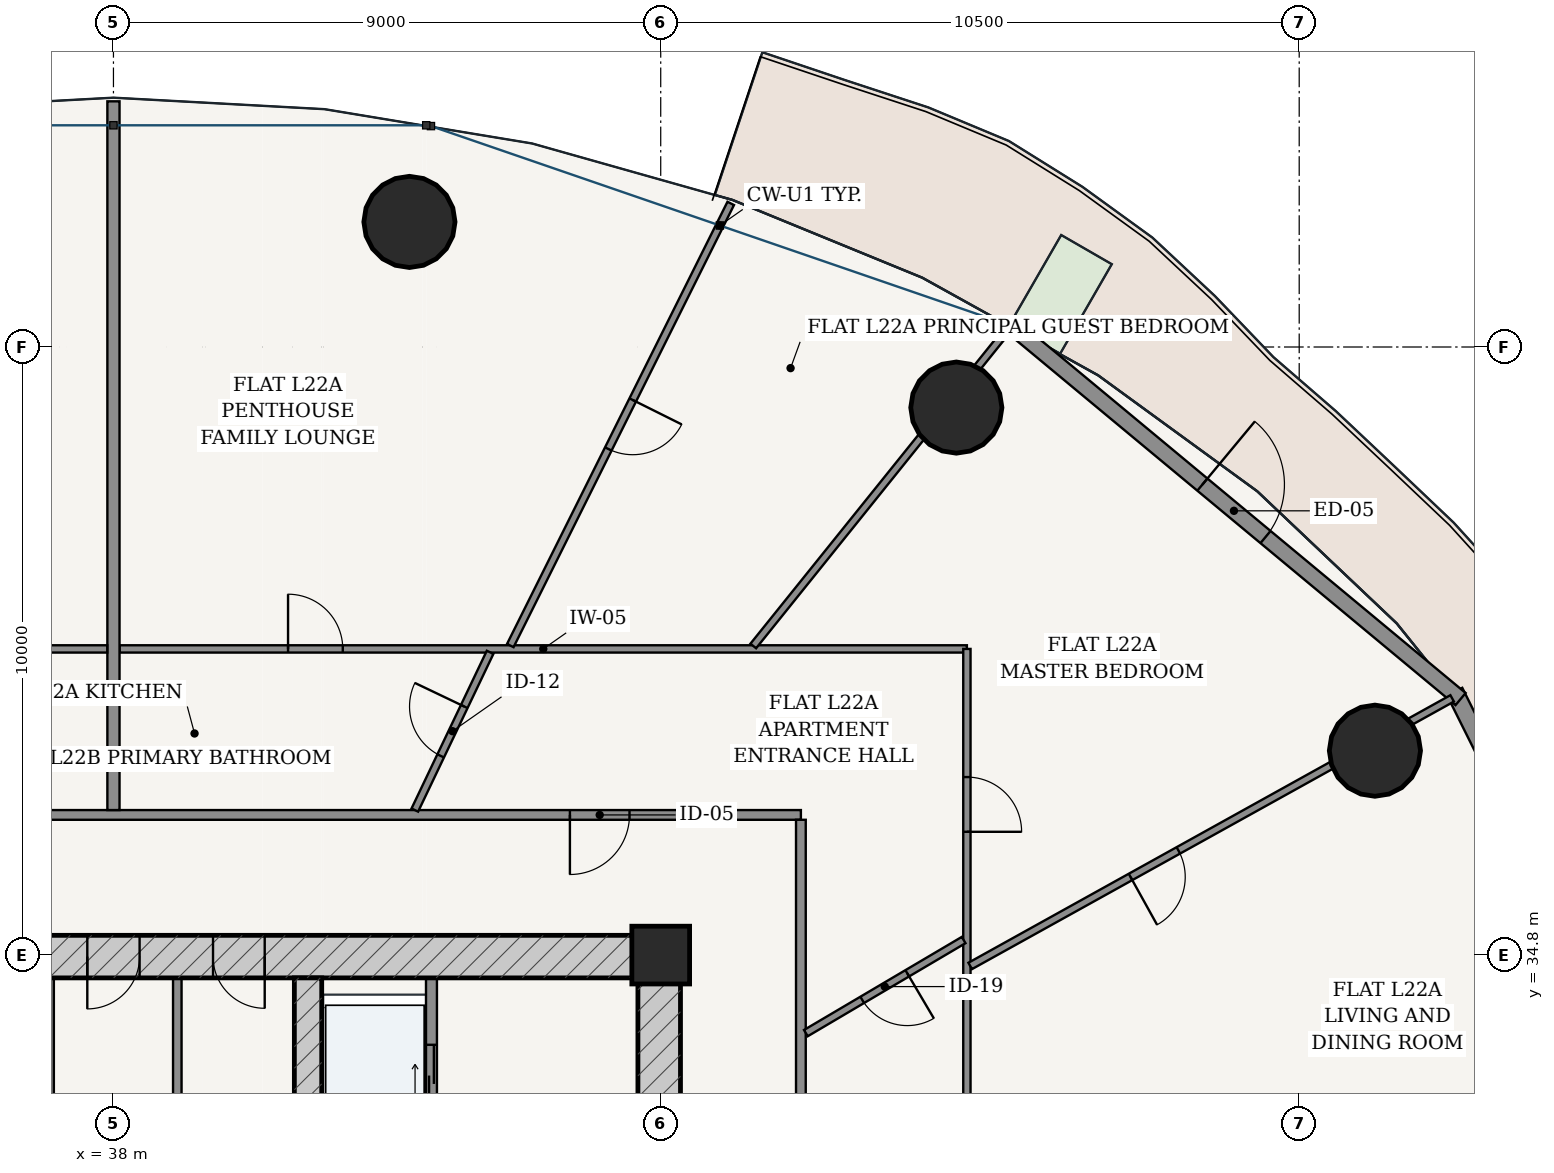
"""IFC4 building model, lengths in metres.
Left out: names, types, materials, properties, quantities, classifications, styles, units other than length and angle.
Written with IfcOpenShell. Run it as: python <this file> out.ifc"""

import sys

from ifc_helpers import new_model, si_unit, direction, frame, frame_2d, origin, origin_2d, place, context, subcontext, project, spatial, rectangle, hollow_circle, extrude, source, transform, mapped, element, fill, save


model = new_model("IFC4")
c1 = context("Model", 3, precision=1e-05, world=origin(), true_north=direction((-0.2419218956, 0.970295726276)))
c2 = subcontext(c1, "Body", "Model", "MODEL_VIEW")
j1 = project(units=[si_unit("LENGTHUNIT", "METRE"), si_unit("PLANEANGLEUNIT", "RADIAN")], contexts=[c1])
p1 = place(None, origin())
s1 = spatial("IfcSite", under=j1, at=p1, CompositionType="ELEMENT")
p2 = place(p1, origin())
s2 = spatial("IfcBuilding", under=s1, at=p2, CompositionType="ELEMENT")
p3 = place(p2, frame((0.0, 0.0, 87.0)))
s3 = spatial("IfcBuildingStorey", under=s2, at=p3, CompositionType="ELEMENT", Elevation=87.0)
p4 = place(p3, frame((47.0, 34.8, 0.0), z_axis=(0.0, 0.0, 1.0), x_axis=(1.0, 0.0, 0.0)))
e1 = element("IfcColumn", 1, at=p4, inside=s3, PredefinedType="COLUMN", context=c2, shape_type="SweptSolid", body=[
    extrude(rectangle(XDim=0.95, YDim=0.95, at=origin_2d()), origin(), (0.0, 0.0, 1.0), 3.6),
])
p5 = place(p3, frame((28.675, 34.775, 0.0), z_axis=(0.0, 0.0, 1.0), x_axis=(1.0, 0.0, 0.0)))
e2 = element("IfcWall", 2, at=p5, inside=s3, PredefinedType="SHEAR", context=c2, shape_type="SweptSolid", body=[
    extrude(rectangle(XDim=18.65, YDim=0.7, at=frame_2d((9.325, 0.0))), origin(), (0.0, 0.0, 1.0), 3.325),
])
p6 = place(p5, frame((6.837, 0.0, 0.0)))
e3 = element("IfcOpeningElement", 3, at=p6, cuts=e2, PredefinedType="OPENING", context=c2, shape_type="SweptSolid", body=[
    extrude(rectangle(XDim=0.85, YDim=2.1, at=frame_2d((0.425, 1.05))), frame((0.0, 0.36, 0.0), z_axis=(0.0, -1.0, 0.0), x_axis=(1.0, 0.0, 0.0)), (0.0, 0.0, 1.0), 0.72),
])
p7 = place(p5, frame((8.895, 0.0, 0.0)))
e4 = element("IfcOpeningElement", 4, at=p7, cuts=e2, PredefinedType="OPENING", context=c2, shape_type="SweptSolid", body=[
    extrude(rectangle(XDim=0.86, YDim=2.1, at=frame_2d((0.43, 1.05))), frame((0.0, 0.36, 0.0), z_axis=(0.0, -1.0, 0.0), x_axis=(1.0, 0.0, 0.0)), (0.0, 0.0, 1.0), 0.72),
])
p8 = place(p5, frame((10.962, 0.0, 0.0)))
e5 = element("IfcOpeningElement", 5, at=p8, cuts=e2, PredefinedType="OPENING", context=c2, shape_type="SweptSolid", body=[
    extrude(rectangle(XDim=0.85, YDim=2.1, at=frame_2d((0.425, 1.05))), frame((0.0, 0.36, 0.0), z_axis=(0.0, -1.0, 0.0), x_axis=(1.0, 0.0, 0.0)), (0.0, 0.0, 1.0), 0.72),
])
p9 = place(p3, frame((46.975, 19.175, 0.0), z_axis=(0.0, 0.0, 1.0), x_axis=(0.0, 1.0, 0.0)))
e6 = element("IfcWall", 6, at=p9, inside=s3, PredefinedType="SHEAR", context=c2, shape_type="SweptSolid", body=[
    extrude(rectangle(XDim=15.25, YDim=0.7, at=frame_2d((7.625, 0.0))), origin(), (0.0, 0.0, 1.0), 3.325),
])
p10 = place(p9, frame((9.875, 0.0, 0.0)))
e7 = element("IfcOpeningElement", 7, at=p10, cuts=e6, PredefinedType="OPENING", context=c2, shape_type="SweptSolid", body=[
    extrude(rectangle(XDim=1.5, YDim=2.2, at=frame_2d((0.75, 1.1))), frame((0.0, 0.36, 0.0), z_axis=(0.0, -1.0, 0.0), x_axis=(1.0, 0.0, 0.0)), (0.0, 0.0, 1.0), 0.72),
])
p11 = place(p3, frame((41.2, 19.175, 0.0), z_axis=(0.0, 0.0, 1.0), x_axis=(0.0, 1.0, 0.0)))
e8 = element("IfcWall", 8, at=p11, inside=s3, PredefinedType="SHEAR", context=c2, shape_type="SweptSolid", body=[
    extrude(rectangle(XDim=15.25, YDim=0.45, at=frame_2d((7.625, 0.0))), origin(), (0.0, 0.0, 1.0), 3.325),
])
p12 = place(p11, frame((7.8, 0.0, 0.0)))
e9 = element("IfcOpeningElement", 9, at=p12, cuts=e8, PredefinedType="OPENING", context=c2, shape_type="SweptSolid", body=[
    extrude(rectangle(XDim=1.05, YDim=2.15, at=frame_2d((0.525, 1.075))), frame((0.0, 0.235, 0.0), z_axis=(0.0, -1.0, 0.0), x_axis=(1.0, 0.0, 0.0)), (0.0, 0.0, 1.0), 0.47),
])
for number, where, z_axis, x_axis in (
    (10, (58.745, 38.161, 0.0), (0.0, 0.0, 1.0), (1.0, 0.0, 0.0)),
    (11, (51.862, 43.803, 0.0), (0.0, 0.0, 1.0), (1.0, 0.0, 0.0)),
    (12, (42.867, 46.857, 0.0), (0.0, 0.0, 1.0), (1.0, 0.0, 0.0)),
):
    element("IfcColumn", number, at=place(p3, frame(where, z_axis=z_axis, x_axis=x_axis)), inside=s3, PredefinedType="COLUMN", context=c2, shape_type="SweptSolid", body=[
        extrude(hollow_circle(Radius=0.75, WallThickness=0.045, at=origin_2d()), origin(), (0.0, 0.0, 1.0), 3.6),
    ])
p13 = place(p3, frame((64.095, 31.034, 0.0), z_axis=(0.0, 0.0, 1.0), x_axis=(-0.446263788661, 0.894901464369, 0.0)))
e13 = element("IfcWall", 13, at=p13, inside=s3, PredefinedType="SOLIDWALL", context=c2, shape_type="SweptSolid", body=[
    extrude(rectangle(XDim=9.05, YDim=0.28, at=frame_2d((4.525, 0.0))), origin(), (0.0, 0.0, 1.0), 3.325),
])
p14 = place(p13, frame((1.394, 0.0, 0.85)))
e14 = element("IfcOpeningElement", 14, at=p14, cuts=e13, PredefinedType="OPENING", context=c2, shape_type="SweptSolid", body=[
    extrude(rectangle(XDim=2.1, YDim=1.95, at=frame_2d((1.05, 0.975))), frame((0.0, 0.15, 0.0), z_axis=(0.0, -1.0, 0.0), x_axis=(1.0, 0.0, 0.0)), (0.0, 0.0, 1.0), 0.3),
])
p15 = place(p13, frame((5.557, 0.0, 0.85)))
e15 = element("IfcOpeningElement", 15, at=p15, cuts=e13, PredefinedType="OPENING", context=c2, shape_type="SweptSolid", body=[
    extrude(rectangle(XDim=2.1, YDim=1.95, at=frame_2d((1.05, 0.975))), frame((0.0, 0.15, 0.0), z_axis=(0.0, -1.0, 0.0), x_axis=(1.0, 0.0, 0.0)), (0.0, 0.0, 1.0), 0.3),
])
p16 = place(p3, frame((60.154, 39.01, 0.0), z_axis=(0.0, 0.0, 1.0), x_axis=(-0.769242574941, 0.638956853706, 0.0)))
e16 = element("IfcWall", 16, at=p16, inside=s3, PredefinedType="SOLIDWALL", context=c2, shape_type="SweptSolid", body=[
    extrude(rectangle(XDim=9.69, YDim=0.26, at=frame_2d((4.845, 0.0))), origin(), (0.0, 0.0, 1.0), 3.325),
])
p17 = place(p16, frame((4.17, 0.0, 0.0)))
e17 = element("IfcOpeningElement", 17, at=p17, cuts=e16, PredefinedType="OPENING", context=c2, shape_type="SweptSolid", body=[
    extrude(rectangle(XDim=1.35, YDim=2.2, at=frame_2d((0.675, 1.1))), frame((0.0, 0.14, 0.0), z_axis=(0.0, -1.0, 0.0), x_axis=(1.0, 0.0, 0.0)), (0.0, 0.0, 1.0), 0.28),
])
p18 = place(p3, frame((43.23, 28.52, 0.0), z_axis=(0.0, 0.0, 1.0), x_axis=(0.0, 1.0, 0.0)))
e18 = element("IfcWall", 18, at=p18, inside=s3, PredefinedType="PARTITIONING", context=c2, shape_type="SweptSolid", body=[
    extrude(rectangle(XDim=5.905, YDim=0.18, at=frame_2d((2.953, 0.0))), origin(), (0.0, 0.0, 1.0), 3.325),
])
p19 = place(p18, frame((0.905, 0.0, 0.0)))
e19 = element("IfcOpeningElement", 19, at=p19, cuts=e18, PredefinedType="OPENING", context=c2, shape_type="SweptSolid", body=[
    extrude(rectangle(XDim=0.85, YDim=2.1, at=frame_2d((0.425, 1.05))), frame((0.0, 0.1, 0.0), z_axis=(0.0, -1.0, 0.0), x_axis=(1.0, 0.0, 0.0)), (0.0, 0.0, 1.0), 0.2),
])
p20 = place(p18, frame((3.655, 0.0, 0.0)))
e20 = element("IfcOpeningElement", 20, at=p20, cuts=e18, PredefinedType="OPENING", context=c2, shape_type="SweptSolid", body=[
    extrude(rectangle(XDim=1.15, YDim=2.2, at=frame_2d((0.575, 1.1))), frame((0.0, 0.1, 0.0), z_axis=(0.0, -1.0, 0.0), x_axis=(1.0, 0.0, 0.0)), (0.0, 0.0, 1.0), 0.2),
])
for number, where, z_axis, x_axis in (
    (21, (36.95, 31.2, 0.0), (0.0, 0.0, 1.0), (0.0, 1.0, 0.0)),
    (22, (39.05, 31.2, 0.0), (0.0, 0.0, 1.0), (0.0, 1.0, 0.0)),
):
    element("IfcWall", number, at=place(p3, frame(where, z_axis=z_axis, x_axis=x_axis)), inside=s3, PredefinedType="PARTITIONING", context=c2, shape_type="SweptSolid", body=[
        extrude(rectangle(XDim=3.225, YDim=0.14, at=frame_2d((1.613, 0.0))), origin(), (0.0, 0.0, 1.0), 3.325),
    ])
p21 = place(p3, frame((26.695, 37.105, 0.0), z_axis=(0.0, 0.0, 1.0), x_axis=(1.0, 0.0, 0.0)))
e23 = element("IfcWall", 23, at=p21, inside=s3, PredefinedType="PARTITIONING", context=c2, shape_type="SweptSolid", body=[
    extrude(rectangle(XDim=22.61, YDim=0.16, at=frame_2d((11.305, 0.0))), origin(), (0.0, 0.0, 1.0), 2.767),
])
p22 = place(p21, frame((18.812, 0.0, 0.0)))
e24 = element("IfcOpeningElement", 24, at=p22, cuts=e23, PredefinedType="OPENING", context=c2, shape_type="SweptSolid", body=[
    extrude(rectangle(XDim=0.98, YDim=2.2, at=frame_2d((0.49, 1.1))), frame((0.0, 0.09, 0.0), z_axis=(0.0, -1.0, 0.0), x_axis=(1.0, 0.0, 0.0)), (0.0, 0.0, 1.0), 0.18),
])
p23 = place(p21, frame((2.823, 0.0, 0.0)))
e25 = element("IfcOpeningElement", 25, at=p23, cuts=e23, PredefinedType="OPENING", context=c2, shape_type="SweptSolid", body=[
    extrude(rectangle(XDim=0.98, YDim=2.2, at=frame_2d((0.49, 1.1))), frame((0.0, 0.09, 0.0), z_axis=(0.0, -1.0, 0.0), x_axis=(1.0, 0.0, 0.0)), (0.0, 0.0, 1.0), 0.18),
])
p24 = place(p3, frame((49.305, 16.575, 0.0), z_axis=(0.0, 0.0, 1.0), x_axis=(0.0, 1.0, 0.0)))
e26 = element("IfcWall", 26, at=p24, inside=s3, PredefinedType="PARTITIONING", context=c2, shape_type="SweptSolid", body=[
    extrude(rectangle(XDim=20.45, YDim=0.16, at=frame_2d((10.225, 0.0))), origin(), (0.0, 0.0, 1.0), 2.767),
])
p25 = place(p24, frame((1.649, 0.0, 0.0)))
e27 = element("IfcOpeningElement", 27, at=p25, cuts=e26, PredefinedType="OPENING", context=c2, shape_type="SweptSolid", body=[
    extrude(rectangle(XDim=0.98, YDim=2.2, at=frame_2d((0.49, 1.1))), frame((0.0, 0.09, 0.0), z_axis=(0.0, -1.0, 0.0), x_axis=(1.0, 0.0, 0.0)), (0.0, 0.0, 1.0), 0.18),
])
p26 = place(p3, frame((38.102, 39.835, 0.0), z_axis=(0.0, 0.0, 1.0), x_axis=(1.0, 0.0, 0.0)))
e28 = element("IfcWall", 28, at=p26, inside=s3, PredefinedType="PARTITIONING", context=c2, shape_type="SweptSolid", body=[
    extrude(rectangle(XDim=13.933, YDim=0.12, at=frame_2d((6.966, 0.0))), origin(), (0.0, 0.0, 1.0), 2.767),
])
p27 = place(p26, frame((2.769, 0.0, 0.0)))
e29 = element("IfcOpeningElement", 29, at=p27, cuts=e28, PredefinedType="OPENING", context=c2, shape_type="SweptSolid", body=[
    extrude(rectangle(XDim=0.9, YDim=2.15, at=frame_2d((0.45, 1.075))), frame((0.0, 0.07, 0.0), z_axis=(0.0, -1.0, 0.0), x_axis=(1.0, 0.0, 0.0)), (0.0, 0.0, 1.0), 0.14),
])
p28 = place(p3, frame((52.035, 39.835, 0.0), z_axis=(0.0, 0.0, 1.0), x_axis=(0.0, -1.0, 0.0)))
e30 = element("IfcWall", 30, at=p28, inside=s3, PredefinedType="PARTITIONING", context=c2, shape_type="SweptSolid", body=[
    extrude(rectangle(XDim=10.614, YDim=0.12, at=frame_2d((5.307, 0.0))), origin(), (0.0, 0.0, 1.0), 2.767),
])
p29 = place(p28, frame((2.107, 0.0, 0.0)))
e31 = element("IfcOpeningElement", 31, at=p29, cuts=e30, PredefinedType="OPENING", context=c2, shape_type="SweptSolid", body=[
    extrude(rectangle(XDim=0.9, YDim=2.15, at=frame_2d((0.45, 1.075))), frame((0.0, 0.07, 0.0), z_axis=(0.0, -1.0, 0.0), x_axis=(1.0, 0.0, 0.0)), (0.0, 0.0, 1.0), 0.14),
])
p30 = place(p3, frame((52.089, 34.622, 0.0), z_axis=(0.0, 0.0, 1.0), x_axis=(0.874324904351, 0.485341077626, 0.0)))
e32 = element("IfcWall", 32, at=p30, inside=s3, PredefinedType="PARTITIONING", context=c2, shape_type="SweptSolid", body=[
    extrude(rectangle(XDim=9.066, YDim=0.12, at=frame_2d((4.533, 0.0))), origin(), (0.0, 0.0, 1.0), 2.767),
])
p31 = place(p30, frame((3.016, 0.0, 0.0)))
e33 = element("IfcOpeningElement", 33, at=p31, cuts=e32, PredefinedType="OPENING", context=c2, shape_type="SweptSolid", body=[
    extrude(rectangle(XDim=0.9, YDim=2.15, at=frame_2d((0.45, 1.075))), frame((0.0, 0.07, 0.0), z_axis=(0.0, -1.0, 0.0), x_axis=(1.0, 0.0, 0.0)), (0.0, 0.0, 1.0), 0.14),
])
p32 = place(p3, frame((48.522, 39.883, 0.0), z_axis=(0.0, 0.0, 1.0), x_axis=(0.62672583251, 0.779239841682, 0.0)))
e34 = element("IfcWall", 34, at=p32, inside=s3, PredefinedType="PARTITIONING", context=c2, shape_type="SweptSolid", body=[
    extrude(rectangle(XDim=6.678, YDim=0.12, at=frame_2d((3.339, 0.0))), origin(), (0.0, 0.0, 1.0), 2.767),
])
p33 = place(p3, frame((44.526, 39.89, 0.0), z_axis=(0.0, 0.0, 1.0), x_axis=(0.446167584581, 0.894949432353, 0.0)))
e35 = element("IfcWall", 35, at=p33, inside=s3, PredefinedType="PARTITIONING", context=c2, shape_type="SweptSolid", body=[
    extrude(rectangle(XDim=8.125, YDim=0.12, at=frame_2d((4.062, 0.0))), origin(), (0.0, 0.0, 1.0), 2.767),
])
p34 = place(p33, frame((3.612, 0.0, 0.0)))
e36 = element("IfcOpeningElement", 36, at=p34, cuts=e35, PredefinedType="OPENING", context=c2, shape_type="SweptSolid", body=[
    extrude(rectangle(XDim=0.9, YDim=2.15, at=frame_2d((0.45, 1.075))), frame((0.0, 0.07, 0.0), z_axis=(0.0, -1.0, 0.0), x_axis=(1.0, 0.0, 0.0)), (0.0, 0.0, 1.0), 0.14),
])
p35 = place(p3, frame((49.387, 33.517, 0.0), z_axis=(0.0, 0.0, 1.0), x_axis=(0.861344081849, 0.508022019862, 0.0)))
e37 = element("IfcWall", 37, at=p35, inside=s3, PredefinedType="PARTITIONING", context=c2, shape_type="SweptSolid", body=[
    extrude(rectangle(XDim=3.013, YDim=0.12, at=frame_2d((1.506, 0.0))), origin(), (0.0, 0.0, 1.0), 3.325),
])
p36 = place(p35, frame((1.076, 0.0, 0.0)))
e38 = element("IfcOpeningElement", 38, at=p36, cuts=e37, PredefinedType="OPENING", context=c2, shape_type="SweptSolid", body=[
    extrude(rectangle(XDim=0.86, YDim=2.15, at=frame_2d((0.43, 1.075))), frame((0.0, 0.07, 0.0), z_axis=(0.0, -1.0, 0.0), x_axis=(1.0, 0.0, 0.0)), (0.0, 0.0, 1.0), 0.14),
])
p37 = place(p3, frame((42.956, 37.185, 0.0), z_axis=(0.0, 0.0, 1.0), x_axis=(0.430728013923, 0.902481788194, 0.0)))
e39 = element("IfcWall", 39, at=p37, inside=s3, PredefinedType="PARTITIONING", context=c2, shape_type="SweptSolid", body=[
    extrude(rectangle(XDim=2.874, YDim=0.12, at=frame_2d((1.437, 0.0))), origin(), (0.0, 0.0, 1.0), 3.325),
])
p38 = place(p37, frame((0.987, 0.0, 0.0)))
e40 = element("IfcOpeningElement", 40, at=p38, cuts=e39, PredefinedType="OPENING", context=c2, shape_type="SweptSolid", body=[
    extrude(rectangle(XDim=0.9, YDim=2.15, at=frame_2d((0.45, 1.075))), frame((0.0, 0.07, 0.0), z_axis=(0.0, -1.0, 0.0), x_axis=(1.0, 0.0, 0.0)), (0.0, 0.0, 1.0), 0.14),
])
p39 = place(p3, frame((38.0, 37.185, 0.0), z_axis=(0.0, 0.0, 1.0), x_axis=(0.0, 1.0, 0.0)))
e41 = element("IfcWall", 41, at=p39, inside=s3, PredefinedType="PARTITIONING", context=c2, shape_type="SweptSolid", body=[
    extrude(rectangle(XDim=11.655, YDim=0.2, at=frame_2d((5.828, 0.0))), origin(), (0.0, 0.0, 1.0), 2.767),
])
p40 = place(p3, frame((23.965, 39.835, 0.0), z_axis=(0.0, 0.0, 1.0), x_axis=(1.0, 0.0, 0.0)))
e42 = element("IfcWall", 42, at=p40, inside=s3, PredefinedType="PARTITIONING", context=c2, shape_type="SweptSolid", body=[
    extrude(rectangle(XDim=13.933, YDim=0.12, at=frame_2d((6.966, 0.0))), origin(), (0.0, 0.0, 1.0), 2.767),
])
p41 = place(p40, frame((3.636, 0.0, 0.0)))
e43 = element("IfcOpeningElement", 43, at=p41, cuts=e42, PredefinedType="OPENING", context=c2, shape_type="SweptSolid", body=[
    extrude(rectangle(XDim=0.9, YDim=2.15, at=frame_2d((0.45, 1.075))), frame((0.0, 0.07, 0.0), z_axis=(0.0, -1.0, 0.0), x_axis=(1.0, 0.0, 0.0)), (0.0, 0.0, 1.0), 0.14),
])
m1 = source(origin(), c2, "Body", "SweptSolid", [
    extrude(rectangle(XDim=1.35, YDim=2.2, at=frame_2d((0.675, 1.1))), frame((0.0, 0.025, 0.0), z_axis=(0.0, -1.0, 0.0), x_axis=(1.0, 0.0, 0.0)), (0.0, 0.0, 1.0), 0.05),
])
p42 = place(p17, frame((1.35, 0.0, 0.0), z_axis=(0.0, 0.0, 1.0), x_axis=(-1.0, 0.0, 0.0)))
e44 = element("IfcDoor", 44, at=p42, inside=s3, OperationType="SINGLE_SWING_LEFT", PredefinedType="DOOR", context=c2, shape_type="MappedRepresentation", body=[
    mapped(m1, transform((0.0, 0.0, 0.0), scale=1.0)),
])
fill(e17, e44)
m2 = source(origin(), c2, "Body", "SweptSolid", [
    extrude(rectangle(XDim=0.86, YDim=2.1, at=frame_2d((0.43, 1.05))), frame((0.0, 0.025, 0.0), z_axis=(0.0, -1.0, 0.0), x_axis=(1.0, 0.0, 0.0)), (0.0, 0.0, 1.0), 0.05),
])
p43 = place(p7, frame((0.86, 0.0, 0.0), z_axis=(0.0, 0.0, 1.0), x_axis=(-1.0, 0.0, 0.0)))
e45 = element("IfcDoor", 45, at=p43, inside=s3, OperationType="SINGLE_SWING_RIGHT", PredefinedType="DOOR", context=c2, shape_type="MappedRepresentation", body=[
    mapped(m2, transform((0.0, 0.0, 0.0), scale=1.0)),
])
fill(e4, e45)
m3 = source(origin(), c2, "Body", "SweptSolid", [
    extrude(rectangle(XDim=0.85, YDim=2.1, at=frame_2d((0.425, 1.05))), frame((0.0, 0.025, 0.0), z_axis=(0.0, -1.0, 0.0), x_axis=(1.0, 0.0, 0.0)), (0.0, 0.0, 1.0), 0.05),
])
p44 = place(p8, frame((0.85, 0.0, 0.0), z_axis=(0.0, 0.0, 1.0), x_axis=(-1.0, 0.0, 0.0)))
e46 = element("IfcDoor", 46, at=p44, inside=s3, OperationType="SINGLE_SWING_LEFT", PredefinedType="DOOR", context=c2, shape_type="MappedRepresentation", body=[
    mapped(m3, transform((0.0, 0.0, 0.0), scale=1.0)),
])
fill(e5, e46)
m4 = source(origin(), c2, "Body", "SweptSolid", [
    extrude(rectangle(XDim=1.15, YDim=2.2, at=frame_2d((0.575, 1.1))), frame((0.0, 0.025, 0.0), z_axis=(0.0, -1.0, 0.0), x_axis=(1.0, 0.0, 0.0)), (0.0, 0.0, 1.0), 0.05),
])
p45 = place(p20, origin())
e47 = element("IfcDoor", 47, at=p45, inside=s3, OperationType="DOUBLE_DOOR_SLIDING", PredefinedType="DOOR", context=c2, shape_type="MappedRepresentation", body=[
    mapped(m4, transform((0.0, 0.0, 0.0), scale=1.0)),
])
fill(e20, e47)
m5 = source(origin(), c2, "Body", "SweptSolid", [
    extrude(rectangle(XDim=0.98, YDim=2.2, at=frame_2d((0.49, 1.1))), frame((0.0, 0.025, 0.0), z_axis=(0.0, -1.0, 0.0), x_axis=(1.0, 0.0, 0.0)), (0.0, 0.0, 1.0), 0.05),
])
p46 = place(p22, frame((0.98, 0.0, 0.0), z_axis=(0.0, 0.0, 1.0), x_axis=(-1.0, 0.0, 0.0)))
e48 = element("IfcDoor", 48, at=p46, inside=s3, OperationType="SINGLE_SWING_RIGHT", PredefinedType="DOOR", context=c2, shape_type="MappedRepresentation", body=[
    mapped(m5, transform((0.0, 0.0, 0.0), scale=1.0)),
])
fill(e24, e48)
m6 = source(origin(), c2, "Body", "SweptSolid", [
    extrude(rectangle(XDim=0.86, YDim=2.15, at=frame_2d((0.43, 1.075))), frame((0.0, 0.025, 0.0), z_axis=(0.0, -1.0, 0.0), x_axis=(1.0, 0.0, 0.0)), (0.0, 0.0, 1.0), 0.05),
])
p47 = place(p36, frame((0.86, 0.0, 0.0), z_axis=(0.0, 0.0, 1.0), x_axis=(-1.0, 0.0, 0.0)))
e49 = element("IfcDoor", 49, at=p47, inside=s3, OperationType="SINGLE_SWING_LEFT", PredefinedType="DOOR", context=c2, shape_type="MappedRepresentation", body=[
    mapped(m6, transform((0.0, 0.0, 0.0), scale=1.0)),
])
fill(e38, e49)
m7 = source(origin(), c2, "Body", "SweptSolid", [
    extrude(rectangle(XDim=0.9, YDim=2.15, at=frame_2d((0.45, 1.075))), frame((0.0, 0.025, 0.0), z_axis=(0.0, -1.0, 0.0), x_axis=(1.0, 0.0, 0.0)), (0.0, 0.0, 1.0), 0.05),
])
p48 = place(p38, origin())
e50 = element("IfcDoor", 50, at=p48, inside=s3, OperationType="SINGLE_SWING_RIGHT", PredefinedType="DOOR", context=c2, shape_type="MappedRepresentation", body=[
    mapped(m7, transform((0.0, 0.0, 0.0), scale=1.0)),
])
fill(e40, e50)
p49 = place(p27, origin())
e51 = element("IfcDoor", 51, at=p49, inside=s3, OperationType="SINGLE_SWING_LEFT", PredefinedType="DOOR", context=c2, shape_type="MappedRepresentation", body=[
    mapped(m7, transform((0.0, 0.0, 0.0), scale=1.0)),
])
fill(e29, e51)
p50 = place(p29, origin())
e52 = element("IfcDoor", 52, at=p50, inside=s3, OperationType="SINGLE_SWING_RIGHT", PredefinedType="DOOR", context=c2, shape_type="MappedRepresentation", body=[
    mapped(m7, transform((0.0, 0.0, 0.0), scale=1.0)),
])
fill(e31, e52)
p51 = place(p34, frame((0.9, 0.0, 0.0), z_axis=(0.0, 0.0, 1.0), x_axis=(-1.0, 0.0, 0.0)))
e53 = element("IfcDoor", 53, at=p51, inside=s3, OperationType="SINGLE_SWING_LEFT", PredefinedType="DOOR", context=c2, shape_type="MappedRepresentation", body=[
    mapped(m7, transform((0.0, 0.0, 0.0), scale=1.0)),
])
fill(e36, e53)
p52 = place(p31, frame((0.9, 0.0, 0.0), z_axis=(0.0, 0.0, 1.0), x_axis=(-1.0, 0.0, 0.0)))
e54 = element("IfcDoor", 54, at=p52, inside=s3, OperationType="SINGLE_SWING_RIGHT", PredefinedType="DOOR", context=c2, shape_type="MappedRepresentation", body=[
    mapped(m7, transform((0.0, 0.0, 0.0), scale=1.0)),
])
fill(e33, e54)
save(model, sys.argv[1])
